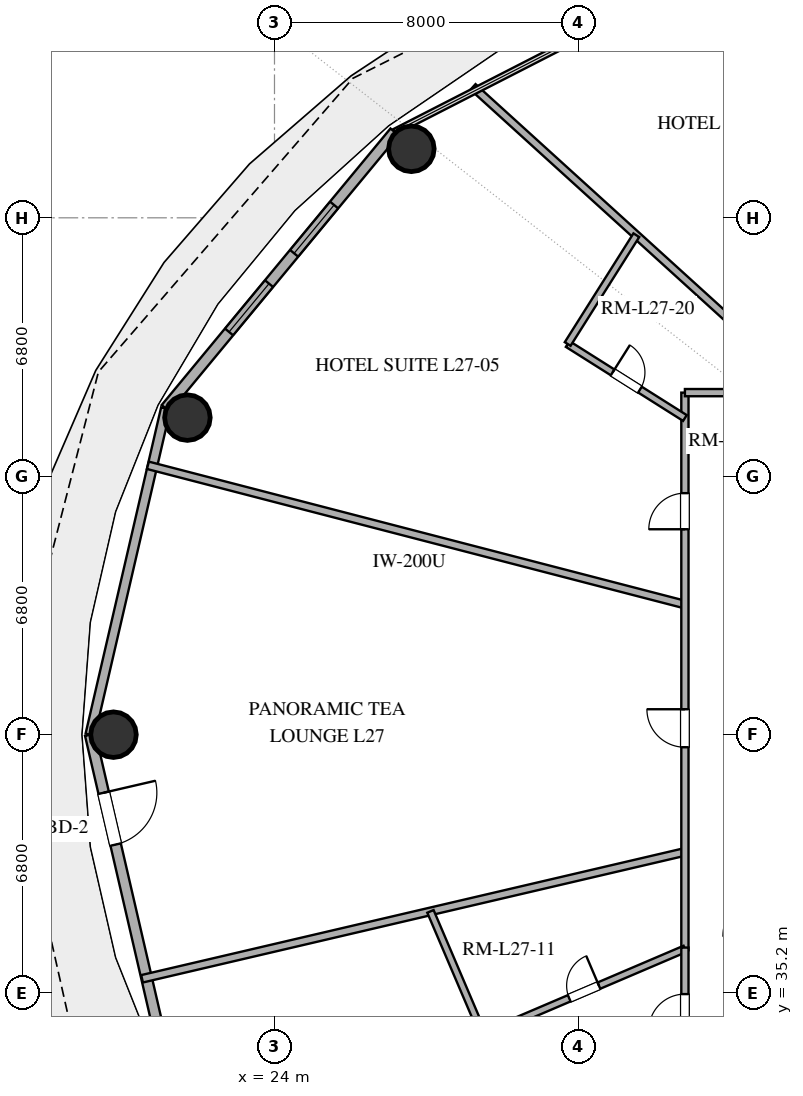
"""IFC4 building model, lengths in metres.
Left out: names, types, materials, properties, quantities, classifications, styles, units other than length and angle.
Written with IfcOpenShell. Run it as: python <this file> out.ifc"""

import sys

from ifc_helpers import new_model, si_unit, direction, frame, frame_2d, origin, origin_2d, place, context, subcontext, project, spatial, rectangle, hollow_circle, extrude, element, fill, save


model = new_model("IFC4")
c1 = context("Model", 3, precision=1e-05, world=origin(), true_north=direction((0.0, 1.0)))
c2 = subcontext(c1, "Body", "Model", "MODEL_VIEW")
j1 = project(units=[si_unit("LENGTHUNIT", "METRE"), si_unit("PLANEANGLEUNIT", "RADIAN")], contexts=[c1])
p1 = place(None, origin())
s1 = spatial("IfcSite", under=j1, at=p1, CompositionType="ELEMENT")
p2 = place(p1, origin())
s2 = spatial("IfcBuilding", under=s1, at=p2, CompositionType="ELEMENT")
p3 = place(p2, frame((0.0, 0.0, 109.2)))
s3 = spatial("IfcBuildingStorey", under=s2, at=p3, CompositionType="ELEMENT", Elevation=109.2)
for number, where, z_axis, x_axis in (
    (1, (27.602, 57.415, 0.0), (0.0, 0.0, 1.0), (1.0, 0.0, 0.0)),
    (2, (21.709, 50.343, 0.0), (0.0, 0.0, 1.0), (1.0, 0.0, 0.0)),
    (3, (19.763, 42.0, 0.0), (0.0, 0.0, 1.0), (1.0, 0.0, 0.0)),
):
    element("IfcColumn", number, at=place(p3, frame(where, z_axis=z_axis, x_axis=x_axis)), inside=s3, PredefinedType="COLUMN", context=c2, shape_type="SweptSolid", body=[
        extrude(hollow_circle(Radius=0.6, WallThickness=0.032, at=origin_2d()), origin(), (0.0, 0.0, 1.0), 3.38),
    ])
p4 = place(p3, frame((27.16, 57.86, 0.0), z_axis=(0.0, 0.0, 1.0), x_axis=(-0.637505817448, -0.770445541696, 0.0)))
e4 = element("IfcWall", 4, at=p4, inside=s3, PredefinedType="SOLIDWALL", context=c2, shape_type="SweptSolid", body=[
    extrude(rectangle(XDim=9.445, YDim=0.28, at=frame_2d((4.723, 0.0))), origin(), (0.0, 0.0, 1.0), 3.38),
])
p5 = place(p4, frame((2.497, 0.0, 0.85)))
e5 = element("IfcOpeningElement", 5, at=p5, cuts=e4, PredefinedType="OPENING", context=c2, shape_type="SweptSolid", body=[
    extrude(rectangle(XDim=1.65, YDim=2.0, at=frame_2d((0.825, 1.0))), frame((0.0, 0.15, 0.0), z_axis=(0.0, -1.0, 0.0), x_axis=(1.0, 0.0, 0.0)), (0.0, 0.0, 1.0), 0.3),
])
p6 = place(p4, frame((5.182, 0.0, 0.85)))
e6 = element("IfcOpeningElement", 6, at=p6, cuts=e4, PredefinedType="OPENING", context=c2, shape_type="SweptSolid", body=[
    extrude(rectangle(XDim=1.65, YDim=2.0, at=frame_2d((0.825, 1.0))), frame((0.0, 0.15, 0.0), z_axis=(0.0, -1.0, 0.0), x_axis=(1.0, 0.0, 0.0)), (0.0, 0.0, 1.0), 0.3),
])
p7 = place(p3, frame((21.139, 50.583, 0.0), z_axis=(0.0, 0.0, 1.0), x_axis=(-0.22558597182, -0.974223264616, 0.0)))
e7 = element("IfcWall", 7, at=p7, inside=s3, PredefinedType="SOLIDWALL", context=c2, shape_type="SweptSolid", body=[
    extrude(rectangle(XDim=8.811, YDim=0.25, at=frame_2d((4.405, 0.0))), origin(), (0.0, 0.0, 1.0), 3.38),
])
p8 = place(p3, frame((19.151, 42.0, 0.0), z_axis=(0.0, 0.0, 1.0), x_axis=(0.22558597182, -0.974223264616, 0.0)))
e8 = element("IfcWall", 8, at=p8, inside=s3, PredefinedType="SOLIDWALL", context=c2, shape_type="SweptSolid", body=[
    extrude(rectangle(XDim=8.811, YDim=0.28, at=frame_2d((4.405, 0.0))), origin(), (0.0, 0.0, 1.0), 3.38),
])
p9 = place(p8, frame((1.568, 0.0, 0.0)))
e9 = element("IfcOpeningElement", 9, at=p9, cuts=e8, PredefinedType="OPENING", context=c2, shape_type="SweptSolid", body=[
    extrude(rectangle(XDim=1.4, YDim=2.2, at=frame_2d((0.7, 1.1))), frame((0.0, 0.15, 0.0), z_axis=(0.0, -1.0, 0.0), x_axis=(1.0, 0.0, 0.0)), (0.0, 0.0, 1.0), 0.3),
])
p10 = place(p3, frame((34.8, 45.423, 0.0), z_axis=(0.0, 0.0, 1.0), x_axis=(-0.967976280286, 0.251041671447, 0.0)))
e10 = element("IfcWall", 10, at=p10, inside=s3, PredefinedType="PARTITIONING", context=c2, shape_type="SweptSolid", body=[
    extrude(rectangle(XDim=14.598, YDim=0.2, at=frame_2d((7.299, 0.0))), origin(), (0.0, 0.0, 1.0), 2.74),
])
p11 = place(p3, frame((34.8, 38.915, 0.0), z_axis=(0.0, 0.0, 1.0), x_axis=(-0.973762218061, -0.227567885864, 0.0)))
e11 = element("IfcWall", 11, at=p11, inside=s3, PredefinedType="PARTITIONING", context=c2, shape_type="SweptSolid", body=[
    extrude(rectangle(XDim=14.67, YDim=0.2, at=frame_2d((7.335, 0.0))), origin(), (0.0, 0.0, 1.0), 2.74),
])
p12 = place(p3, frame((34.8, 36.329, 0.0), z_axis=(0.0, 0.0, 1.0), x_axis=(0.0, 1.0, 0.0)))
e12 = element("IfcWall", 12, at=p12, inside=s3, PredefinedType="PARTITIONING", context=c2, shape_type="SweptSolid", body=[
    extrude(rectangle(XDim=14.671, YDim=0.19, at=frame_2d((7.336, 0.0))), origin(), (0.0, 0.0, 1.0), 2.74),
])
p13 = place(p12, frame((5.341, 0.0, 0.0)))
e13 = element("IfcOpeningElement", 13, at=p13, cuts=e12, PredefinedType="OPENING", context=c2, shape_type="SweptSolid", body=[
    extrude(rectangle(XDim=1.0, YDim=2.2, at=frame_2d((0.5, 1.1))), frame((0.0, 0.105, 0.0), z_axis=(0.0, -1.0, 0.0), x_axis=(1.0, 0.0, 0.0)), (0.0, 0.0, 1.0), 0.21),
])
p14 = place(p12, frame((11.076, 0.0, 0.0)))
e14 = element("IfcOpeningElement", 14, at=p14, cuts=e12, PredefinedType="OPENING", context=c2, shape_type="SweptSolid", body=[
    extrude(rectangle(XDim=0.95, YDim=2.15, at=frame_2d((0.475, 1.075))), frame((0.0, 0.105, 0.0), z_axis=(0.0, -1.0, 0.0), x_axis=(1.0, 0.0, 0.0)), (0.0, 0.0, 1.0), 0.21),
])
p15 = place(p3, frame((38.085, 51.0, 0.0), z_axis=(0.0, 0.0, 1.0), x_axis=(-0.74043922717, 0.672123315224, 0.0)))
e15 = element("IfcWall", 15, at=p15, inside=s3, PredefinedType="PARTITIONING", context=c2, shape_type="SweptSolid", body=[
    extrude(rectangle(XDim=11.968, YDim=0.2, at=frame_2d((5.984, 0.0))), origin(), (0.0, 0.0, 1.0), 2.74),
])
p16 = place(p3, frame((29.493, 34.097, 0.0), z_axis=(0.0, 0.0, 1.0), x_axis=(0.919684682014, 0.392657720755, 0.0)))
e16 = element("IfcWall", 16, at=p16, inside=s3, PredefinedType="PLUMBINGWALL", context=c2, shape_type="SweptSolid", body=[
    extrude(rectangle(XDim=5.771, YDim=0.18, at=frame_2d((2.885, 0.0))), origin(), (0.0, 0.0, 1.0), 2.74),
])
p17 = place(p16, frame((2.46, 0.0, 0.0)))
e17 = element("IfcOpeningElement", 17, at=p17, cuts=e16, PredefinedType="OPENING", context=c2, shape_type="SweptSolid", body=[
    extrude(rectangle(XDim=0.85, YDim=2.1, at=frame_2d((0.425, 1.05))), frame((0.0, 0.1, 0.0), z_axis=(0.0, -1.0, 0.0), x_axis=(1.0, 0.0, 0.0)), (0.0, 0.0, 1.0), 0.2),
])
p18 = place(p3, frame((34.8, 51.0, 0.0), z_axis=(0.0, 0.0, 1.0), x_axis=(1.0, 0.0, 0.0)))
e18 = element("IfcWall", 18, at=p18, inside=s3, PredefinedType="PARTITIONING", context=c2, shape_type="SweptSolid", body=[
    extrude(rectangle(XDim=9.945, YDim=0.19, at=frame_2d((4.972, 0.0))), origin(), (0.0, 0.0, 1.0), 2.74),
])
p19 = place(p18, frame((5.159, 0.0, 0.0)))
e19 = element("IfcOpeningElement", 19, at=p19, cuts=e18, PredefinedType="OPENING", context=c2, shape_type="SweptSolid", body=[
    extrude(rectangle(XDim=0.95, YDim=2.15, at=frame_2d((0.475, 1.075))), frame((0.0, 0.105, 0.0), z_axis=(0.0, -1.0, 0.0), x_axis=(1.0, 0.0, 0.0)), (0.0, 0.0, 1.0), 0.21),
])
p20 = place(p3, frame((31.715, 52.28, 0.0), z_axis=(0.0, 0.0, 1.0), x_axis=(0.845617675202, -0.533789047645, 0.0)))
e20 = element("IfcWall", 20, at=p20, inside=s3, PredefinedType="PLUMBINGWALL", context=c2, shape_type="SweptSolid", body=[
    extrude(rectangle(XDim=3.648, YDim=0.18, at=frame_2d((1.824, 0.0))), origin(), (0.0, 0.0, 1.0), 2.74),
])
p21 = place(p20, frame((1.399, 0.0, 0.0)))
e21 = element("IfcOpeningElement", 21, at=p21, cuts=e20, PredefinedType="OPENING", context=c2, shape_type="SweptSolid", body=[
    extrude(rectangle(XDim=0.85, YDim=2.1, at=frame_2d((0.425, 1.05))), frame((0.0, 0.1, 0.0), z_axis=(0.0, -1.0, 0.0), x_axis=(1.0, 0.0, 0.0)), (0.0, 0.0, 1.0), 0.2),
])
p22 = place(p3, frame((28.104, 37.35, 0.0), z_axis=(0.0, 0.0, 1.0), x_axis=(0.392677696951, -0.919676152957, 0.0)))
e22 = element("IfcWall", 22, at=p22, inside=s3, PredefinedType="PLUMBINGWALL", context=c2, shape_type="SweptSolid", body=[
    extrude(rectangle(XDim=3.537, YDim=0.18, at=frame_2d((1.769, 0.0))), origin(), (0.0, 0.0, 1.0), 2.74),
])
p23 = place(p3, frame((34.8, 33.0, 0.0), z_axis=(0.0, 0.0, 1.0), x_axis=(0.0, 1.0, 0.0)))
e23 = element("IfcWall", 23, at=p23, inside=s3, PredefinedType="PARTITIONING", context=c2, shape_type="SweptSolid", body=[
    extrude(rectangle(XDim=3.398, YDim=0.19, at=frame_2d((1.699, 0.0))), origin(), (0.0, 0.0, 1.0), 2.74),
])
p24 = place(p23, frame((1.224, 0.0, 0.0)))
e24 = element("IfcOpeningElement", 24, at=p24, cuts=e23, PredefinedType="OPENING", context=c2, shape_type="SweptSolid", body=[
    extrude(rectangle(XDim=0.95, YDim=2.15, at=frame_2d((0.475, 1.075))), frame((0.0, 0.105, 0.0), z_axis=(0.0, -1.0, 0.0), x_axis=(1.0, 0.0, 0.0)), (0.0, 0.0, 1.0), 0.21),
])
p25 = place(p3, frame((33.522, 55.142, 0.0), z_axis=(0.0, 0.0, 1.0), x_axis=(-0.533805735916, -0.845607140641, 0.0)))
e25 = element("IfcWall", 25, at=p25, inside=s3, PredefinedType="PLUMBINGWALL", context=c2, shape_type="SweptSolid", body=[
    extrude(rectangle(XDim=3.385, YDim=0.18, at=frame_2d((1.692, 0.0))), origin(), (0.0, 0.0, 1.0), 2.74),
])
p26 = place(p5, origin())
e26 = element("IfcWindow", 26, at=p26, inside=s3, PartitioningType="SINGLE_PANEL", PredefinedType="WINDOW", context=c2, shape_type="SweptSolid", body=[
    extrude(rectangle(XDim=1.65, YDim=2.0, at=frame_2d((0.825, 1.0))), frame((0.0, 0.03, 0.0), z_axis=(0.0, -1.0, 0.0), x_axis=(1.0, 0.0, 0.0)), (0.0, 0.0, 1.0), 0.06),
])
fill(e5, e26)
p27 = place(p6, origin())
e27 = element("IfcWindow", 27, at=p27, inside=s3, PartitioningType="SINGLE_PANEL", PredefinedType="WINDOW", context=c2, shape_type="SweptSolid", body=[
    extrude(rectangle(XDim=1.65, YDim=2.0, at=frame_2d((0.825, 1.0))), frame((0.0, 0.03, 0.0), z_axis=(0.0, -1.0, 0.0), x_axis=(1.0, 0.0, 0.0)), (0.0, 0.0, 1.0), 0.06),
])
fill(e6, e27)
p28 = place(p9, origin())
e28 = element("IfcDoor", 28, at=p28, inside=s3, OperationType="SINGLE_SWING_LEFT", PredefinedType="DOOR", context=c2, shape_type="SweptSolid", body=[
    extrude(rectangle(XDim=1.4, YDim=2.2, at=frame_2d((0.7, 1.1))), frame((0.0, 0.025, 0.0), z_axis=(0.0, -1.0, 0.0), x_axis=(1.0, 0.0, 0.0)), (0.0, 0.0, 1.0), 0.05),
])
fill(e9, e28)
p29 = place(p13, origin())
e29 = element("IfcDoor", 29, at=p29, inside=s3, OperationType="SINGLE_SWING_RIGHT", PredefinedType="DOOR", context=c2, shape_type="SweptSolid", body=[
    extrude(rectangle(XDim=1.0, YDim=2.2, at=frame_2d((0.5, 1.1))), frame((0.0, 0.025, 0.0), z_axis=(0.0, -1.0, 0.0), x_axis=(1.0, 0.0, 0.0)), (0.0, 0.0, 1.0), 0.05),
])
fill(e13, e29)
p30 = place(p14, origin())
e30 = element("IfcDoor", 30, at=p30, inside=s3, OperationType="SINGLE_SWING_LEFT", PredefinedType="DOOR", context=c2, shape_type="SweptSolid", body=[
    extrude(rectangle(XDim=0.95, YDim=2.15, at=frame_2d((0.475, 1.075))), frame((0.0, 0.025, 0.0), z_axis=(0.0, -1.0, 0.0), x_axis=(1.0, 0.0, 0.0)), (0.0, 0.0, 1.0), 0.05),
])
fill(e14, e30)
p31 = place(p17, origin())
e31 = element("IfcDoor", 31, at=p31, inside=s3, OperationType="SINGLE_SWING_RIGHT", PredefinedType="DOOR", context=c2, shape_type="SweptSolid", body=[
    extrude(rectangle(XDim=0.85, YDim=2.1, at=frame_2d((0.425, 1.05))), frame((0.0, 0.025, 0.0), z_axis=(0.0, -1.0, 0.0), x_axis=(1.0, 0.0, 0.0)), (0.0, 0.0, 1.0), 0.05),
])
fill(e17, e31)
p32 = place(p21, origin())
e32 = element("IfcDoor", 32, at=p32, inside=s3, OperationType="SINGLE_SWING_LEFT", PredefinedType="DOOR", context=c2, shape_type="SweptSolid", body=[
    extrude(rectangle(XDim=0.85, YDim=2.1, at=frame_2d((0.425, 1.05))), frame((0.0, 0.025, 0.0), z_axis=(0.0, -1.0, 0.0), x_axis=(1.0, 0.0, 0.0)), (0.0, 0.0, 1.0), 0.05),
])
fill(e21, e32)
p33 = place(p24, origin())
e33 = element("IfcDoor", 33, at=p33, inside=s3, OperationType="SINGLE_SWING_LEFT", PredefinedType="DOOR", context=c2, shape_type="SweptSolid", body=[
    extrude(rectangle(XDim=0.95, YDim=2.15, at=frame_2d((0.475, 1.075))), frame((0.0, 0.025, 0.0), z_axis=(0.0, -1.0, 0.0), x_axis=(1.0, 0.0, 0.0)), (0.0, 0.0, 1.0), 0.05),
])
fill(e24, e33)
save(model, sys.argv[1])
